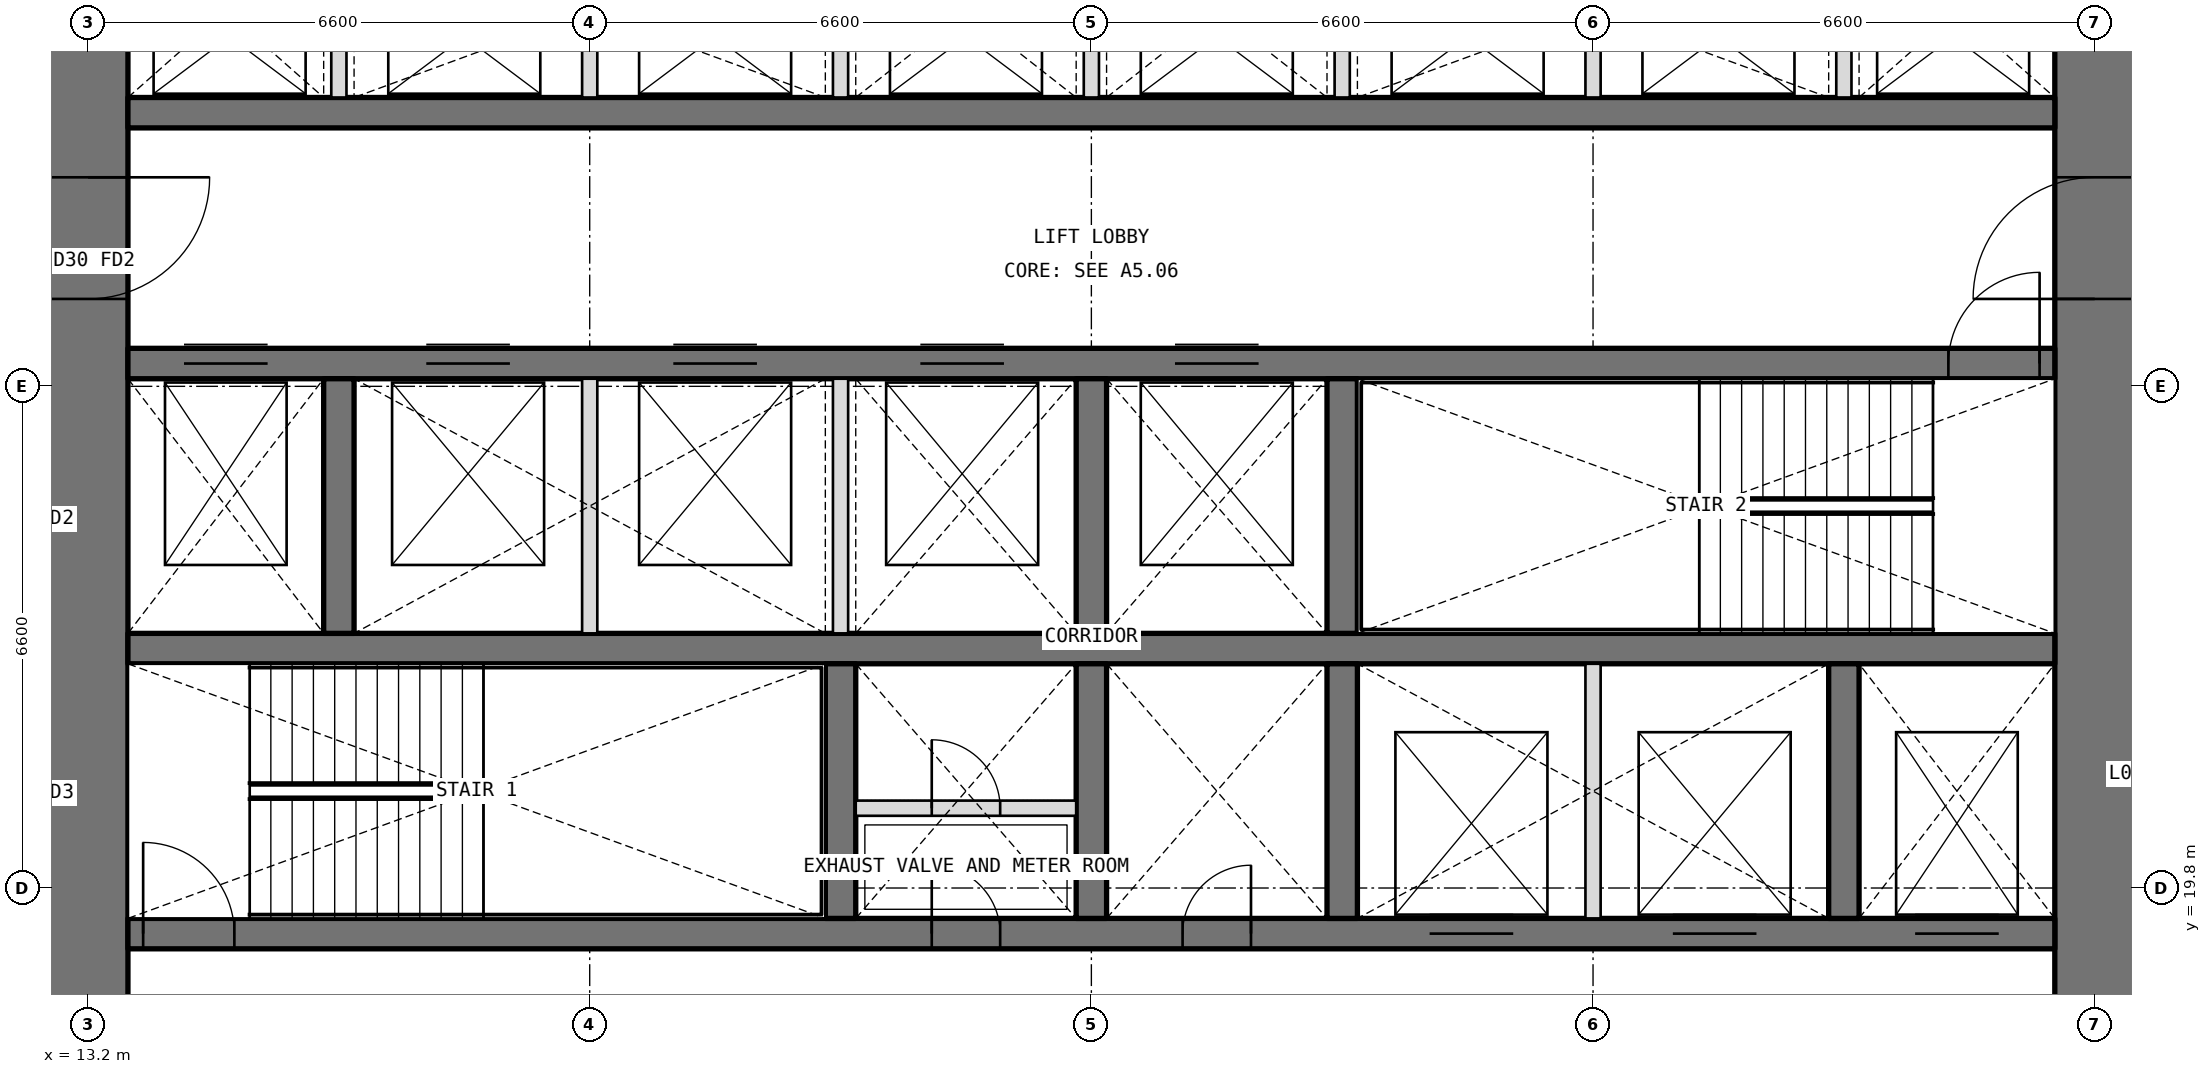
"""IFC4 building model, lengths in metres.
Left out: names, types, materials, properties, quantities, classifications, styles, units other than length and angle.
Written with IfcOpenShell. Run it as: python <this file> out.ifc"""

import sys

from ifc_helpers import new_model, si_unit, direction, frame, frame_2d, origin, place, context, subcontext, project, spatial, rectangle, extrude, element, fill, save


model = new_model("IFC4")
c1 = context("Model", 3, precision=1e-05, world=origin(), true_north=direction((0.0, 1.0)))
c2 = subcontext(c1, "Body", "Model", "MODEL_VIEW")
j1 = project(units=[si_unit("LENGTHUNIT", "METRE"), si_unit("PLANEANGLEUNIT", "RADIAN")], contexts=[c1])
p1 = place(None, origin())
s1 = spatial("IfcSite", under=j1, at=p1, CompositionType="ELEMENT")
p2 = place(p1, origin())
s2 = spatial("IfcBuilding", under=s1, at=p2, CompositionType="ELEMENT")
p3 = place(p2, frame((0.0, 0.0, 21.3)))
s3 = spatial("IfcBuildingStorey", under=s2, at=p3, CompositionType="ELEMENT", Elevation=21.3)
p4 = place(p3, frame((39.6, 13.725, 0.0), z_axis=(0.0, 0.0, 1.0), x_axis=(0.0, 1.0, 0.0)))
e1 = element("IfcWall", 1, at=p4, inside=s3, PredefinedType="SHEAR", context=c2, shape_type="SweptSolid", body=[
    extrude(rectangle(XDim=18.75, YDim=1.05, at=frame_2d((9.375, 0.0))), origin(), (0.0, 0.0, 1.0), 4.2),
])
p5 = place(p4, frame((3.025, 0.0, 0.0)))
e2 = element("IfcOpeningElement", 2, at=p5, cuts=e1, PredefinedType="OPENING", context=c2, shape_type="SweptSolid", body=[
    extrude(rectangle(XDim=1.6, YDim=2.1, at=frame_2d((0.8, 1.05))), frame((0.0, 0.535, 0.0), z_axis=(0.0, -1.0, 0.0), x_axis=(1.0, 0.0, 0.0)), (0.0, 0.0, 1.0), 1.07),
])
p6 = place(p4, frame((13.825, 0.0, 0.0)))
e3 = element("IfcOpeningElement", 3, at=p6, cuts=e1, PredefinedType="OPENING", context=c2, shape_type="SweptSolid", body=[
    extrude(rectangle(XDim=1.6, YDim=2.1, at=frame_2d((0.8, 1.05))), frame((0.0, 0.535, 0.0), z_axis=(0.0, -1.0, 0.0), x_axis=(1.0, 0.0, 0.0)), (0.0, 0.0, 1.0), 1.07),
])
p7 = place(p3, frame((13.2, 32.475, 0.0), z_axis=(0.0, 0.0, 1.0), x_axis=(0.0, -1.0, 0.0)))
e4 = element("IfcWall", 4, at=p7, inside=s3, PredefinedType="SHEAR", context=c2, shape_type="SweptSolid", body=[
    extrude(rectangle(XDim=18.75, YDim=1.05, at=frame_2d((9.375, 0.0))), origin(), (0.0, 0.0, 1.0), 4.2),
])
p8 = place(p7, frame((14.125, 0.0, 0.0)))
e5 = element("IfcOpeningElement", 5, at=p8, cuts=e4, PredefinedType="OPENING", context=c2, shape_type="SweptSolid", body=[
    extrude(rectangle(XDim=1.6, YDim=2.1, at=frame_2d((0.8, 1.05))), frame((0.0, 0.535, 0.0), z_axis=(0.0, -1.0, 0.0), x_axis=(1.0, 0.0, 0.0)), (0.0, 0.0, 1.0), 1.07),
])
p9 = place(p7, frame((3.325, 0.0, 0.0)))
e6 = element("IfcOpeningElement", 6, at=p9, cuts=e4, PredefinedType="OPENING", context=c2, shape_type="SweptSolid", body=[
    extrude(rectangle(XDim=1.6, YDim=2.1, at=frame_2d((0.8, 1.05))), frame((0.0, 0.535, 0.0), z_axis=(0.0, -1.0, 0.0), x_axis=(1.0, 0.0, 0.0)), (0.0, 0.0, 1.0), 1.07),
])
p10 = place(p3, frame((13.725, 19.2, 0.0), z_axis=(0.0, 0.0, 1.0), x_axis=(1.0, 0.0, 0.0)))
e7 = element("IfcWall", 7, at=p10, inside=s3, PredefinedType="SHEAR", context=c2, shape_type="SweptSolid", body=[
    extrude(rectangle(XDim=25.35, YDim=0.4, at=frame_2d((12.675, 0.0))), origin(), (0.0, 0.0, 1.0), 4.2),
])
p11 = place(p10, frame((10.575, 0.0, 0.0)))
e8 = element("IfcOpeningElement", 8, at=p11, cuts=e7, PredefinedType="OPENING", context=c2, shape_type="SweptSolid", body=[
    extrude(rectangle(XDim=0.9, YDim=2.1, at=frame_2d((0.45, 1.05))), frame((0.0, 0.21, 0.0), z_axis=(0.0, -1.0, 0.0), x_axis=(1.0, 0.0, 0.0)), (0.0, 0.0, 1.0), 0.42),
])
p12 = place(p10, frame((13.875, 0.0, 0.0)))
e9 = element("IfcOpeningElement", 9, at=p12, cuts=e7, PredefinedType="OPENING", context=c2, shape_type="SweptSolid", body=[
    extrude(rectangle(XDim=0.9, YDim=2.1, at=frame_2d((0.45, 1.05))), frame((0.0, 0.21, 0.0), z_axis=(0.0, -1.0, 0.0), x_axis=(1.0, 0.0, 0.0)), (0.0, 0.0, 1.0), 0.42),
])
p13 = place(p10, frame((0.2, 0.0, 0.0)))
e10 = element("IfcOpeningElement", 10, at=p13, cuts=e7, PredefinedType="OPENING", context=c2, shape_type="SweptSolid", body=[
    extrude(rectangle(XDim=1.2, YDim=2.1, at=frame_2d((0.6, 1.05))), frame((0.0, 0.21, 0.0), z_axis=(0.0, -1.0, 0.0), x_axis=(1.0, 0.0, 0.0)), (0.0, 0.0, 1.0), 0.42),
])
p14 = place(p10, frame((23.512, 0.0, 0.0)))
e11 = element("IfcOpeningElement", 11, at=p14, cuts=e7, PredefinedType="OPENING", context=c2, shape_type="SweptSolid", body=[
    extrude(rectangle(XDim=1.1, YDim=2.1, at=frame_2d((0.55, 1.05))), frame((0.0, 0.21, 0.0), z_axis=(0.0, -1.0, 0.0), x_axis=(1.0, 0.0, 0.0)), (0.0, 0.0, 1.0), 0.42),
])
p15 = place(p10, frame((17.125, 0.0, 0.0)))
e12 = element("IfcOpeningElement", 12, at=p15, cuts=e7, PredefinedType="OPENING", context=c2, shape_type="SweptSolid", body=[
    extrude(rectangle(XDim=1.1, YDim=2.1, at=frame_2d((0.55, 1.05))), frame((0.0, 0.21, 0.0), z_axis=(0.0, -1.0, 0.0), x_axis=(1.0, 0.0, 0.0)), (0.0, 0.0, 1.0), 0.42),
])
p16 = place(p10, frame((20.325, 0.0, 0.0)))
e13 = element("IfcOpeningElement", 13, at=p16, cuts=e7, PredefinedType="OPENING", context=c2, shape_type="SweptSolid", body=[
    extrude(rectangle(XDim=1.1, YDim=2.1, at=frame_2d((0.55, 1.05))), frame((0.0, 0.21, 0.0), z_axis=(0.0, -1.0, 0.0), x_axis=(1.0, 0.0, 0.0)), (0.0, 0.0, 1.0), 0.42),
])
p17 = place(p3, frame((13.725, 22.95, 0.0), z_axis=(0.0, 0.0, 1.0), x_axis=(1.0, 0.0, 0.0)))
e14 = element("IfcWall", 14, at=p17, inside=s3, PredefinedType="SHEAR", context=c2, shape_type="SweptSolid", body=[
    extrude(rectangle(XDim=25.35, YDim=0.4, at=frame_2d((12.675, 0.0))), origin(), (0.0, 0.0, 1.0), 4.2),
])
p18 = place(p3, frame((13.725, 26.7, 0.0), z_axis=(0.0, 0.0, 1.0), x_axis=(1.0, 0.0, 0.0)))
e15 = element("IfcWall", 15, at=p18, inside=s3, PredefinedType="SHEAR", context=c2, shape_type="SweptSolid", body=[
    extrude(rectangle(XDim=25.35, YDim=0.4, at=frame_2d((12.675, 0.0))), origin(), (0.0, 0.0, 1.0), 4.2),
])
p19 = place(p18, frame((23.95, 0.0, 0.0)))
e16 = element("IfcOpeningElement", 16, at=p19, cuts=e15, PredefinedType="OPENING", context=c2, shape_type="SweptSolid", body=[
    extrude(rectangle(XDim=1.2, YDim=2.1, at=frame_2d((0.6, 1.05))), frame((0.0, 0.21, 0.0), z_axis=(0.0, -1.0, 0.0), x_axis=(1.0, 0.0, 0.0)), (0.0, 0.0, 1.0), 0.42),
])
p20 = place(p18, frame((0.738, 0.0, 0.0)))
e17 = element("IfcOpeningElement", 17, at=p20, cuts=e15, PredefinedType="OPENING", context=c2, shape_type="SweptSolid", body=[
    extrude(rectangle(XDim=1.1, YDim=2.1, at=frame_2d((0.55, 1.05))), frame((0.0, 0.21, 0.0), z_axis=(0.0, -1.0, 0.0), x_axis=(1.0, 0.0, 0.0)), (0.0, 0.0, 1.0), 0.42),
])
p21 = place(p18, frame((3.925, 0.0, 0.0)))
e18 = element("IfcOpeningElement", 18, at=p21, cuts=e15, PredefinedType="OPENING", context=c2, shape_type="SweptSolid", body=[
    extrude(rectangle(XDim=1.1, YDim=2.1, at=frame_2d((0.55, 1.05))), frame((0.0, 0.21, 0.0), z_axis=(0.0, -1.0, 0.0), x_axis=(1.0, 0.0, 0.0)), (0.0, 0.0, 1.0), 0.42),
])
p22 = place(p18, frame((7.175, 0.0, 0.0)))
e19 = element("IfcOpeningElement", 19, at=p22, cuts=e15, PredefinedType="OPENING", context=c2, shape_type="SweptSolid", body=[
    extrude(rectangle(XDim=1.1, YDim=2.1, at=frame_2d((0.55, 1.05))), frame((0.0, 0.21, 0.0), z_axis=(0.0, -1.0, 0.0), x_axis=(1.0, 0.0, 0.0)), (0.0, 0.0, 1.0), 0.42),
])
p23 = place(p18, frame((10.425, 0.0, 0.0)))
e20 = element("IfcOpeningElement", 20, at=p23, cuts=e15, PredefinedType="OPENING", context=c2, shape_type="SweptSolid", body=[
    extrude(rectangle(XDim=1.1, YDim=2.1, at=frame_2d((0.55, 1.05))), frame((0.0, 0.21, 0.0), z_axis=(0.0, -1.0, 0.0), x_axis=(1.0, 0.0, 0.0)), (0.0, 0.0, 1.0), 0.42),
])
p24 = place(p18, frame((13.775, 0.0, 0.0)))
e21 = element("IfcOpeningElement", 21, at=p24, cuts=e15, PredefinedType="OPENING", context=c2, shape_type="SweptSolid", body=[
    extrude(rectangle(XDim=1.1, YDim=2.1, at=frame_2d((0.55, 1.05))), frame((0.0, 0.21, 0.0), z_axis=(0.0, -1.0, 0.0), x_axis=(1.0, 0.0, 0.0)), (0.0, 0.0, 1.0), 0.42),
])
p25 = place(p3, frame((13.725, 30.0, 0.0), z_axis=(0.0, 0.0, 1.0), x_axis=(1.0, 0.0, 0.0)))
e22 = element("IfcWall", 22, at=p25, inside=s3, PredefinedType="SHEAR", context=c2, shape_type="SweptSolid", body=[
    extrude(rectangle(XDim=25.35, YDim=0.4, at=frame_2d((12.675, 0.0))), origin(), (0.0, 0.0, 1.0), 4.2),
])
for number, where, z_axis, x_axis in (
    (23, (23.1, 19.4, 0.0), (0.0, 0.0, 1.0), (0.0, 1.0, 0.0)),
    (24, (26.4, 19.4, 0.0), (0.0, 0.0, 1.0), (0.0, 1.0, 0.0)),
    (25, (29.7, 19.4, 0.0), (0.0, 0.0, 1.0), (0.0, 1.0, 0.0)),
    (26, (36.3, 19.4, 0.0), (0.0, 0.0, 1.0), (0.0, 1.0, 0.0)),
    (27, (16.5, 23.15, 0.0), (0.0, 0.0, 1.0), (0.0, 1.0, 0.0)),
    (28, (26.4, 23.15, 0.0), (0.0, 0.0, 1.0), (0.0, 1.0, 0.0)),
    (29, (29.7, 23.15, 0.0), (0.0, 0.0, 1.0), (0.0, 1.0, 0.0)),
):
    element("IfcWall", number, at=place(p3, frame(where, z_axis=z_axis, x_axis=x_axis)), inside=s3, PredefinedType="SHEAR", context=c2, shape_type="SweptSolid", body=[
        extrude(rectangle(XDim=3.35, YDim=0.4, at=frame_2d((1.675, 0.0))), origin(), (0.0, 0.0, 1.0), 4.2),
    ])
for number, where, z_axis, x_axis in (
    (30, (16.5, 30.2, 0.0), (0.0, 0.0, 1.0), (0.0, 1.0, 0.0)),
    (31, (19.8, 30.2, 0.0), (0.0, 0.0, 1.0), (0.0, 1.0, 0.0)),
    (32, (23.1, 30.2, 0.0), (0.0, 0.0, 1.0), (0.0, 1.0, 0.0)),
    (33, (26.4, 30.2, 0.0), (0.0, 0.0, 1.0), (0.0, 1.0, 0.0)),
    (34, (29.7, 30.2, 0.0), (0.0, 0.0, 1.0), (0.0, 1.0, 0.0)),
    (35, (33.0, 30.2, 0.0), (0.0, 0.0, 1.0), (0.0, 1.0, 0.0)),
    (36, (36.3, 30.2, 0.0), (0.0, 0.0, 1.0), (0.0, 1.0, 0.0)),
):
    element("IfcWall", number, at=place(p3, frame(where, z_axis=z_axis, x_axis=x_axis)), inside=s3, PredefinedType="PARTITIONING", context=c2, shape_type="SweptSolid", body=[
        extrude(rectangle(XDim=2.275, YDim=0.2, at=frame_2d((1.138, 0.0))), origin(), (0.0, 0.0, 1.0), 4.2),
    ])
for number, where, z_axis, x_axis in (
    (37, (33.0, 19.4, 0.0), (0.0, 0.0, 1.0), (0.0, 1.0, 0.0)),
    (38, (19.8, 23.15, 0.0), (0.0, 0.0, 1.0), (0.0, 1.0, 0.0)),
    (39, (23.1, 23.15, 0.0), (0.0, 0.0, 1.0), (0.0, 1.0, 0.0)),
):
    element("IfcWall", number, at=place(p3, frame(where, z_axis=z_axis, x_axis=x_axis)), inside=s3, PredefinedType="PARTITIONING", context=c2, shape_type="SweptSolid", body=[
        extrude(rectangle(XDim=3.35, YDim=0.2, at=frame_2d((1.675, 0.0))), origin(), (0.0, 0.0, 1.0), 4.2),
    ])
p26 = place(p3, frame((23.3, 20.85, 0.0), z_axis=(0.0, 0.0, 1.0), x_axis=(1.0, 0.0, 0.0)))
e40 = element("IfcWall", 40, at=p26, inside=s3, PredefinedType="PARTITIONING", context=c2, shape_type="SweptSolid", body=[
    extrude(rectangle(XDim=2.9, YDim=0.2, at=frame_2d((1.45, 0.0))), origin(), (0.0, 0.0, 1.0), 3.9),
])
p27 = place(p26, frame((1.0, 0.0, 0.0)))
e41 = element("IfcOpeningElement", 41, at=p27, cuts=e40, PredefinedType="OPENING", context=c2, shape_type="SweptSolid", body=[
    extrude(rectangle(XDim=0.9, YDim=2.1, at=frame_2d((0.45, 1.05))), frame((0.0, 0.11, 0.0), z_axis=(0.0, -1.0, 0.0), x_axis=(1.0, 0.0, 0.0)), (0.0, 0.0, 1.0), 0.22),
])
p28 = place(p11, origin())
e42 = element("IfcDoor", 42, at=p28, inside=s3, OperationType="SINGLE_SWING_LEFT", PredefinedType="DOOR", context=c2, shape_type="SweptSolid", body=[
    extrude(rectangle(XDim=0.9, YDim=2.1, at=frame_2d((0.45, 1.05))), frame((0.0, 0.025, 0.0), z_axis=(0.0, -1.0, 0.0), x_axis=(1.0, 0.0, 0.0)), (0.0, 0.0, 1.0), 0.05),
])
fill(e8, e42)
p29 = place(p27, origin())
e43 = element("IfcDoor", 43, at=p29, inside=s3, OperationType="SINGLE_SWING_LEFT", PredefinedType="DOOR", context=c2, shape_type="SweptSolid", body=[
    extrude(rectangle(XDim=0.9, YDim=2.1, at=frame_2d((0.45, 1.05))), frame((0.0, 0.025, 0.0), z_axis=(0.0, -1.0, 0.0), x_axis=(1.0, 0.0, 0.0)), (0.0, 0.0, 1.0), 0.05),
])
fill(e41, e43)
p30 = place(p12, origin())
e44 = element("IfcDoor", 44, at=p30, inside=s3, OperationType="SINGLE_SWING_RIGHT", PredefinedType="DOOR", context=c2, shape_type="SweptSolid", body=[
    extrude(rectangle(XDim=0.9, YDim=2.1, at=frame_2d((0.45, 1.05))), frame((0.0, 0.025, 0.0), z_axis=(0.0, -1.0, 0.0), x_axis=(1.0, 0.0, 0.0)), (0.0, 0.0, 1.0), 0.05),
])
fill(e9, e44)
p31 = place(p13, origin())
e45 = element("IfcDoor", 45, at=p31, inside=s3, OperationType="SINGLE_SWING_LEFT", PredefinedType="DOOR", context=c2, shape_type="SweptSolid", body=[
    extrude(rectangle(XDim=1.2, YDim=2.1, at=frame_2d((0.6, 1.05))), frame((0.0, 0.025, 0.0), z_axis=(0.0, -1.0, 0.0), x_axis=(1.0, 0.0, 0.0)), (0.0, 0.0, 1.0), 0.05),
])
fill(e10, e45)
p32 = place(p19, origin())
e46 = element("IfcDoor", 46, at=p32, inside=s3, OperationType="SINGLE_SWING_RIGHT", PredefinedType="DOOR", context=c2, shape_type="SweptSolid", body=[
    extrude(rectangle(XDim=1.2, YDim=2.1, at=frame_2d((0.6, 1.05))), frame((0.0, 0.025, 0.0), z_axis=(0.0, -1.0, 0.0), x_axis=(1.0, 0.0, 0.0)), (0.0, 0.0, 1.0), 0.05),
])
fill(e16, e46)
p33 = place(p9, origin())
e47 = element("IfcDoor", 47, at=p33, inside=s3, OperationType="DOUBLE_DOOR_DOUBLE_SWING", PredefinedType="DOOR", context=c2, shape_type="SweptSolid", body=[
    extrude(rectangle(XDim=1.6, YDim=2.1, at=frame_2d((0.8, 1.05))), frame((0.0, 0.025, 0.0), z_axis=(0.0, -1.0, 0.0), x_axis=(1.0, 0.0, 0.0)), (0.0, 0.0, 1.0), 0.05),
])
fill(e6, e47)
p34 = place(p6, origin())
e48 = element("IfcDoor", 48, at=p34, inside=s3, OperationType="DOUBLE_DOOR_DOUBLE_SWING", PredefinedType="DOOR", context=c2, shape_type="SweptSolid", body=[
    extrude(rectangle(XDim=1.6, YDim=2.1, at=frame_2d((0.8, 1.05))), frame((0.0, 0.025, 0.0), z_axis=(0.0, -1.0, 0.0), x_axis=(1.0, 0.0, 0.0)), (0.0, 0.0, 1.0), 0.05),
])
fill(e3, e48)
p35 = place(p20, origin())
e49 = element("IfcDoor", 49, at=p35, inside=s3, OperationType="DOUBLE_DOOR_SLIDING", PredefinedType="DOOR", context=c2, shape_type="SweptSolid", body=[
    extrude(rectangle(XDim=1.1, YDim=2.1, at=frame_2d((0.55, 1.05))), frame((0.0, 0.025, 0.0), z_axis=(0.0, -1.0, 0.0), x_axis=(1.0, 0.0, 0.0)), (0.0, 0.0, 1.0), 0.05),
])
fill(e17, e49)
p36 = place(p14, origin())
e50 = element("IfcDoor", 50, at=p36, inside=s3, OperationType="DOUBLE_DOOR_SLIDING", PredefinedType="DOOR", context=c2, shape_type="SweptSolid", body=[
    extrude(rectangle(XDim=1.1, YDim=2.1, at=frame_2d((0.55, 1.05))), frame((0.0, 0.025, 0.0), z_axis=(0.0, -1.0, 0.0), x_axis=(1.0, 0.0, 0.0)), (0.0, 0.0, 1.0), 0.05),
])
fill(e11, e50)
p37 = place(p15, origin())
e51 = element("IfcDoor", 51, at=p37, inside=s3, OperationType="DOUBLE_DOOR_SLIDING", PredefinedType="DOOR", context=c2, shape_type="SweptSolid", body=[
    extrude(rectangle(XDim=1.1, YDim=2.1, at=frame_2d((0.55, 1.05))), frame((0.0, 0.025, 0.0), z_axis=(0.0, -1.0, 0.0), x_axis=(1.0, 0.0, 0.0)), (0.0, 0.0, 1.0), 0.05),
])
fill(e12, e51)
p38 = place(p16, origin())
e52 = element("IfcDoor", 52, at=p38, inside=s3, OperationType="DOUBLE_DOOR_SLIDING", PredefinedType="DOOR", context=c2, shape_type="SweptSolid", body=[
    extrude(rectangle(XDim=1.1, YDim=2.1, at=frame_2d((0.55, 1.05))), frame((0.0, 0.025, 0.0), z_axis=(0.0, -1.0, 0.0), x_axis=(1.0, 0.0, 0.0)), (0.0, 0.0, 1.0), 0.05),
])
fill(e13, e52)
p39 = place(p21, origin())
e53 = element("IfcDoor", 53, at=p39, inside=s3, OperationType="DOUBLE_DOOR_SLIDING", PredefinedType="DOOR", context=c2, shape_type="SweptSolid", body=[
    extrude(rectangle(XDim=1.1, YDim=2.1, at=frame_2d((0.55, 1.05))), frame((0.0, 0.025, 0.0), z_axis=(0.0, -1.0, 0.0), x_axis=(1.0, 0.0, 0.0)), (0.0, 0.0, 1.0), 0.05),
])
fill(e18, e53)
p40 = place(p22, origin())
e54 = element("IfcDoor", 54, at=p40, inside=s3, OperationType="DOUBLE_DOOR_SLIDING", PredefinedType="DOOR", context=c2, shape_type="SweptSolid", body=[
    extrude(rectangle(XDim=1.1, YDim=2.1, at=frame_2d((0.55, 1.05))), frame((0.0, 0.025, 0.0), z_axis=(0.0, -1.0, 0.0), x_axis=(1.0, 0.0, 0.0)), (0.0, 0.0, 1.0), 0.05),
])
fill(e19, e54)
p41 = place(p23, origin())
e55 = element("IfcDoor", 55, at=p41, inside=s3, OperationType="DOUBLE_DOOR_SLIDING", PredefinedType="DOOR", context=c2, shape_type="SweptSolid", body=[
    extrude(rectangle(XDim=1.1, YDim=2.1, at=frame_2d((0.55, 1.05))), frame((0.0, 0.025, 0.0), z_axis=(0.0, -1.0, 0.0), x_axis=(1.0, 0.0, 0.0)), (0.0, 0.0, 1.0), 0.05),
])
fill(e20, e55)
p42 = place(p24, origin())
e56 = element("IfcDoor", 56, at=p42, inside=s3, OperationType="DOUBLE_DOOR_SLIDING", PredefinedType="DOOR", context=c2, shape_type="SweptSolid", body=[
    extrude(rectangle(XDim=1.1, YDim=2.1, at=frame_2d((0.55, 1.05))), frame((0.0, 0.025, 0.0), z_axis=(0.0, -1.0, 0.0), x_axis=(1.0, 0.0, 0.0)), (0.0, 0.0, 1.0), 0.05),
])
fill(e21, e56)
save(model, sys.argv[1])
